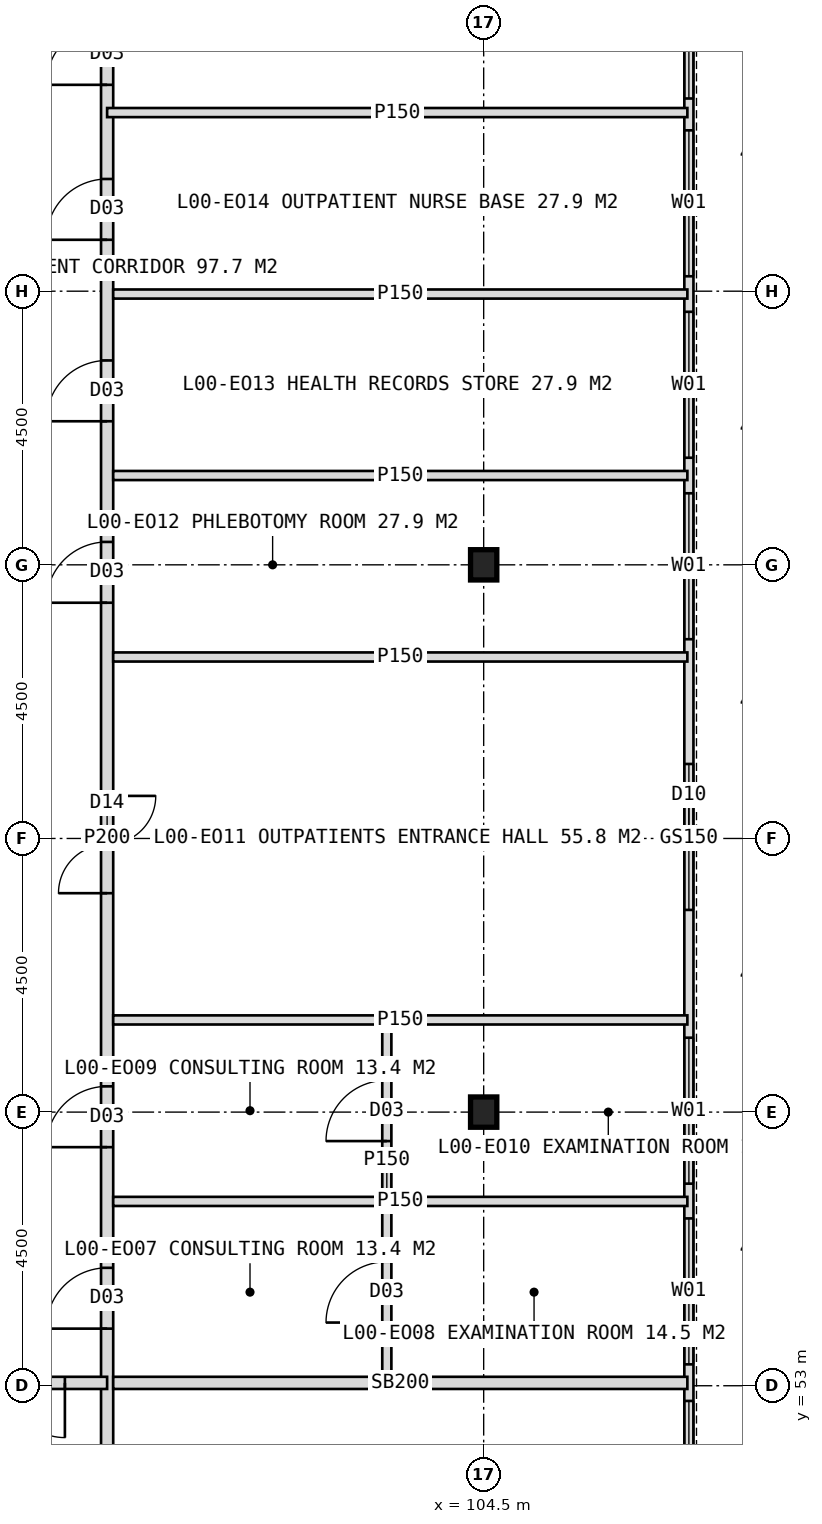
"""IFC4 building model, lengths in metres.
Left out: names, types, materials, properties, quantities, classifications, styles, units other than length and angle.
Written with IfcOpenShell. Run it as: python <this file> out.ifc"""

import sys

from ifc_helpers import new_model, si_unit, direction, frame, frame_2d, origin, origin_2d, place, context, subcontext, project, spatial, rectangle, i_section, extrude, element, fill, save


model = new_model("IFC4")
c1 = context("Model", 3, precision=1e-05, world=origin(), true_north=direction((0.0, 1.0)))
c2 = subcontext(c1, "Body", "Model", "MODEL_VIEW")
j1 = project(units=[si_unit("LENGTHUNIT", "METRE"), si_unit("PLANEANGLEUNIT", "RADIAN")], contexts=[c1])
p1 = place(None, origin())
s1 = spatial("IfcSite", under=j1, at=p1, CompositionType="ELEMENT")
p2 = place(p1, origin())
s2 = spatial("IfcBuilding", under=s1, at=p2, CompositionType="ELEMENT")
p3 = place(p2, origin())
s3 = spatial("IfcBuildingStorey", under=s2, at=p3, CompositionType="ELEMENT", Elevation=0.0)
for number, where, z_axis, x_axis in (
    (1, (104.5, 57.5, 0.0), (0.0, 0.0, 1.0), (1.0, 0.0, 0.0)),
    (2, (104.5, 66.5, 0.0), (0.0, 0.0, 1.0), (1.0, 0.0, 0.0)),
):
    element("IfcColumn", number, at=place(p3, frame(where, z_axis=z_axis, x_axis=x_axis)), inside=s3, PredefinedType="COLUMN", context=c2, shape_type="SweptSolid", body=[
        extrude(i_section(OverallWidth=0.432, OverallDepth=0.498, WebThickness=0.056, FlangeThickness=0.089, FilletRadius=0.015, at=origin_2d()), origin(), (0.0, 0.0, 1.0), 6.0),
    ])
p4 = place(p3, frame((107.875, 38.125, 0.0), z_axis=(0.0, 0.0, 1.0), x_axis=(0.0, 1.0, 0.0)))
e3 = element("IfcWall", 3, at=p4, inside=s3, PredefinedType="STANDARD", context=c2, shape_type="SweptSolid", body=[
    extrude(rectangle(XDim=47.75, YDim=0.15, at=frame_2d((23.875, 0.0))), origin(), (0.0, 0.0, 1.0), 6.0),
])
p5 = place(p4, frame((22.7, 0.0, 0.0)))
e4 = element("IfcOpeningElement", 4, at=p5, cuts=e3, PredefinedType="OPENING", context=c2, shape_type="SweptSolid", body=[
    extrude(rectangle(XDim=2.4, YDim=2.6, at=frame_2d((1.2, 1.3))), frame((0.0, 0.085, 0.0), z_axis=(0.0, -1.0, 0.0), x_axis=(1.0, 0.0, 0.0)), (0.0, 0.0, 1.0), 0.17),
])
p6 = place(p4, frame((0.33, 0.0, 0.6)))
e5 = element("IfcOpeningElement", 5, at=p6, cuts=e3, PredefinedType="OPENING", context=c2, shape_type="SweptSolid", body=[
    extrude(rectangle(XDim=2.4, YDim=3.0, at=frame_2d((1.2, 1.5))), frame((0.0, 0.085, 0.0), z_axis=(0.0, -1.0, 0.0), x_axis=(1.0, 0.0, 0.0)), (0.0, 0.0, 1.0), 0.17),
])
p7 = place(p4, frame((3.277, 0.0, 0.6)))
e6 = element("IfcOpeningElement", 6, at=p7, cuts=e3, PredefinedType="OPENING", context=c2, shape_type="SweptSolid", body=[
    extrude(rectangle(XDim=2.4, YDim=3.0, at=frame_2d((1.2, 1.5))), frame((0.0, 0.085, 0.0), z_axis=(0.0, -1.0, 0.0), x_axis=(1.0, 0.0, 0.0)), (0.0, 0.0, 1.0), 0.17),
])
p8 = place(p4, frame((6.261, 0.0, 0.6)))
e7 = element("IfcOpeningElement", 7, at=p8, cuts=e3, PredefinedType="OPENING", context=c2, shape_type="SweptSolid", body=[
    extrude(rectangle(XDim=2.4, YDim=3.0, at=frame_2d((1.2, 1.5))), frame((0.0, 0.085, 0.0), z_axis=(0.0, -1.0, 0.0), x_axis=(1.0, 0.0, 0.0)), (0.0, 0.0, 1.0), 0.17),
])
p9 = place(p4, frame((9.225, 0.0, 0.6)))
e8 = element("IfcOpeningElement", 8, at=p9, cuts=e3, PredefinedType="OPENING", context=c2, shape_type="SweptSolid", body=[
    extrude(rectangle(XDim=2.4, YDim=3.0, at=frame_2d((1.2, 1.5))), frame((0.0, 0.085, 0.0), z_axis=(0.0, -1.0, 0.0), x_axis=(1.0, 0.0, 0.0)), (0.0, 0.0, 1.0), 0.17),
])
p10 = place(p4, frame((12.225, 0.0, 0.6)))
e9 = element("IfcOpeningElement", 9, at=p10, cuts=e3, PredefinedType="OPENING", context=c2, shape_type="SweptSolid", body=[
    extrude(rectangle(XDim=2.4, YDim=3.0, at=frame_2d((1.2, 1.5))), frame((0.0, 0.085, 0.0), z_axis=(0.0, -1.0, 0.0), x_axis=(1.0, 0.0, 0.0)), (0.0, 0.0, 1.0), 0.17),
])
p11 = place(p4, frame((15.227, 0.0, 0.6)))
e10 = element("IfcOpeningElement", 10, at=p11, cuts=e3, PredefinedType="OPENING", context=c2, shape_type="SweptSolid", body=[
    extrude(rectangle(XDim=2.4, YDim=3.0, at=frame_2d((1.2, 1.5))), frame((0.0, 0.085, 0.0), z_axis=(0.0, -1.0, 0.0), x_axis=(1.0, 0.0, 0.0)), (0.0, 0.0, 1.0), 0.17),
])
p12 = place(p4, frame((18.198, 0.0, 0.6)))
e11 = element("IfcOpeningElement", 11, at=p12, cuts=e3, PredefinedType="OPENING", context=c2, shape_type="SweptSolid", body=[
    extrude(rectangle(XDim=2.4, YDim=3.0, at=frame_2d((1.2, 1.5))), frame((0.0, 0.085, 0.0), z_axis=(0.0, -1.0, 0.0), x_axis=(1.0, 0.0, 0.0)), (0.0, 0.0, 1.0), 0.17),
])
p13 = place(p4, frame((27.152, 0.0, 0.6)))
e12 = element("IfcOpeningElement", 12, at=p13, cuts=e3, PredefinedType="OPENING", context=c2, shape_type="SweptSolid", body=[
    extrude(rectangle(XDim=2.4, YDim=3.0, at=frame_2d((1.2, 1.5))), frame((0.0, 0.085, 0.0), z_axis=(0.0, -1.0, 0.0), x_axis=(1.0, 0.0, 0.0)), (0.0, 0.0, 1.0), 0.17),
])
p14 = place(p4, frame((30.136, 0.0, 0.6)))
e13 = element("IfcOpeningElement", 13, at=p14, cuts=e3, PredefinedType="OPENING", context=c2, shape_type="SweptSolid", body=[
    extrude(rectangle(XDim=2.4, YDim=3.0, at=frame_2d((1.2, 1.5))), frame((0.0, 0.085, 0.0), z_axis=(0.0, -1.0, 0.0), x_axis=(1.0, 0.0, 0.0)), (0.0, 0.0, 1.0), 0.17),
])
p15 = place(p4, frame((33.12, 0.0, 0.6)))
e14 = element("IfcOpeningElement", 14, at=p15, cuts=e3, PredefinedType="OPENING", context=c2, shape_type="SweptSolid", body=[
    extrude(rectangle(XDim=2.4, YDim=3.0, at=frame_2d((1.2, 1.5))), frame((0.0, 0.085, 0.0), z_axis=(0.0, -1.0, 0.0), x_axis=(1.0, 0.0, 0.0)), (0.0, 0.0, 1.0), 0.17),
])
p16 = place(p4, frame((36.044, 0.0, 0.6)))
e15 = element("IfcOpeningElement", 15, at=p16, cuts=e3, PredefinedType="OPENING", context=c2, shape_type="SweptSolid", body=[
    extrude(rectangle(XDim=2.4, YDim=3.0, at=frame_2d((1.2, 1.5))), frame((0.0, 0.085, 0.0), z_axis=(0.0, -1.0, 0.0), x_axis=(1.0, 0.0, 0.0)), (0.0, 0.0, 1.0), 0.17),
])
p17 = place(p4, frame((39.044, 0.0, 0.6)))
e16 = element("IfcOpeningElement", 16, at=p17, cuts=e3, PredefinedType="OPENING", context=c2, shape_type="SweptSolid", body=[
    extrude(rectangle(XDim=2.4, YDim=3.0, at=frame_2d((1.2, 1.5))), frame((0.0, 0.085, 0.0), z_axis=(0.0, -1.0, 0.0), x_axis=(1.0, 0.0, 0.0)), (0.0, 0.0, 1.0), 0.17),
])
p18 = place(p4, frame((42.044, 0.0, 0.6)))
e17 = element("IfcOpeningElement", 17, at=p18, cuts=e3, PredefinedType="OPENING", context=c2, shape_type="SweptSolid", body=[
    extrude(rectangle(XDim=2.4, YDim=3.0, at=frame_2d((1.2, 1.5))), frame((0.0, 0.085, 0.0), z_axis=(0.0, -1.0, 0.0), x_axis=(1.0, 0.0, 0.0)), (0.0, 0.0, 1.0), 0.17),
])
p19 = place(p4, frame((45.044, 0.0, 0.6)))
e18 = element("IfcOpeningElement", 18, at=p19, cuts=e3, PredefinedType="OPENING", context=c2, shape_type="SweptSolid", body=[
    extrude(rectangle(XDim=2.4, YDim=3.0, at=frame_2d((1.2, 1.5))), frame((0.0, 0.085, 0.0), z_axis=(0.0, -1.0, 0.0), x_axis=(1.0, 0.0, 0.0)), (0.0, 0.0, 1.0), 0.17),
])
p20 = place(p3, frame((98.307, 38.15, 0.0), z_axis=(0.0, 0.0, 1.0), x_axis=(0.0, 1.0, 0.0)))
e19 = element("IfcWall", 19, at=p20, inside=s3, PredefinedType="PARTITIONING", context=c2, shape_type="SweptSolid", body=[
    extrude(rectangle(XDim=47.7, YDim=0.2, at=frame_2d((23.85, 0.0))), origin(), (0.0, 0.0, 1.0), 5.7),
])
p21 = place(p20, frame((45.7, 0.0, 0.0)))
e20 = element("IfcOpeningElement", 20, at=p21, cuts=e19, PredefinedType="OPENING", context=c2, shape_type="SweptSolid", body=[
    extrude(rectangle(XDim=1.2, YDim=2.1, at=frame_2d((0.6, 1.05))), frame((0.0, 0.11, 0.0), z_axis=(0.0, -1.0, 0.0), x_axis=(1.0, 0.0, 0.0)), (0.0, 0.0, 1.0), 0.22),
])
p22 = place(p20, frame((36.244, 0.0, 0.0)))
e21 = element("IfcOpeningElement", 21, at=p22, cuts=e19, PredefinedType="OPENING", context=c2, shape_type="SweptSolid", body=[
    extrude(rectangle(XDim=1.0, YDim=2.1, at=frame_2d((0.5, 1.05))), frame((0.0, 0.11, 0.0), z_axis=(0.0, -1.0, 0.0), x_axis=(1.0, 0.0, 0.0)), (0.0, 0.0, 1.0), 0.22),
])
p23 = place(p20, frame((0.93, 0.0, 0.0)))
e22 = element("IfcOpeningElement", 22, at=p23, cuts=e19, PredefinedType="OPENING", context=c2, shape_type="SweptSolid", body=[
    extrude(rectangle(XDim=1.0, YDim=2.1, at=frame_2d((0.5, 1.05))), frame((0.0, 0.11, 0.0), z_axis=(0.0, -1.0, 0.0), x_axis=(1.0, 0.0, 0.0)), (0.0, 0.0, 1.0), 0.22),
])
p24 = place(p20, frame((3.852, 0.0, 0.0)))
e23 = element("IfcOpeningElement", 23, at=p24, cuts=e19, PredefinedType="OPENING", context=c2, shape_type="SweptSolid", body=[
    extrude(rectangle(XDim=1.0, YDim=2.1, at=frame_2d((0.5, 1.05))), frame((0.0, 0.11, 0.0), z_axis=(0.0, -1.0, 0.0), x_axis=(1.0, 0.0, 0.0)), (0.0, 0.0, 1.0), 0.22),
])
p25 = place(p20, frame((6.836, 0.0, 0.0)))
e24 = element("IfcOpeningElement", 24, at=p25, cuts=e19, PredefinedType="OPENING", context=c2, shape_type="SweptSolid", body=[
    extrude(rectangle(XDim=1.0, YDim=2.1, at=frame_2d((0.5, 1.05))), frame((0.0, 0.11, 0.0), z_axis=(0.0, -1.0, 0.0), x_axis=(1.0, 0.0, 0.0)), (0.0, 0.0, 1.0), 0.22),
])
p26 = place(p20, frame((11.012, 0.0, 0.0)))
e25 = element("IfcOpeningElement", 25, at=p26, cuts=e19, PredefinedType="OPENING", context=c2, shape_type="SweptSolid", body=[
    extrude(rectangle(XDim=1.6, YDim=2.2, at=frame_2d((0.8, 1.1))), frame((0.0, 0.11, 0.0), z_axis=(0.0, -1.0, 0.0), x_axis=(1.0, 0.0, 0.0)), (0.0, 0.0, 1.0), 0.22),
])
p27 = place(p20, frame((15.789, 0.0, 0.0)))
e26 = element("IfcOpeningElement", 26, at=p27, cuts=e19, PredefinedType="OPENING", context=c2, shape_type="SweptSolid", body=[
    extrude(rectangle(XDim=1.0, YDim=2.1, at=frame_2d((0.5, 1.05))), frame((0.0, 0.11, 0.0), z_axis=(0.0, -1.0, 0.0), x_axis=(1.0, 0.0, 0.0)), (0.0, 0.0, 1.0), 0.22),
])
p28 = place(p20, frame((18.773, 0.0, 0.0)))
e27 = element("IfcOpeningElement", 27, at=p28, cuts=e19, PredefinedType="OPENING", context=c2, shape_type="SweptSolid", body=[
    extrude(rectangle(XDim=1.0, YDim=2.1, at=frame_2d((0.5, 1.05))), frame((0.0, 0.11, 0.0), z_axis=(0.0, -1.0, 0.0), x_axis=(1.0, 0.0, 0.0)), (0.0, 0.0, 1.0), 0.22),
])
p29 = place(p20, frame((22.95, 0.0, 0.0)))
e28 = element("IfcOpeningElement", 28, at=p29, cuts=e19, PredefinedType="OPENING", context=c2, shape_type="SweptSolid", body=[
    extrude(rectangle(XDim=1.6, YDim=2.2, at=frame_2d((0.8, 1.1))), frame((0.0, 0.11, 0.0), z_axis=(0.0, -1.0, 0.0), x_axis=(1.0, 0.0, 0.0)), (0.0, 0.0, 1.0), 0.22),
])
p30 = place(p20, frame((27.727, 0.0, 0.0)))
e29 = element("IfcOpeningElement", 29, at=p30, cuts=e19, PredefinedType="OPENING", context=c2, shape_type="SweptSolid", body=[
    extrude(rectangle(XDim=1.0, YDim=2.1, at=frame_2d((0.5, 1.05))), frame((0.0, 0.11, 0.0), z_axis=(0.0, -1.0, 0.0), x_axis=(1.0, 0.0, 0.0)), (0.0, 0.0, 1.0), 0.22),
])
p31 = place(p20, frame((30.711, 0.0, 0.0)))
e30 = element("IfcOpeningElement", 30, at=p31, cuts=e19, PredefinedType="OPENING", context=c2, shape_type="SweptSolid", body=[
    extrude(rectangle(XDim=1.0, YDim=2.1, at=frame_2d((0.5, 1.05))), frame((0.0, 0.11, 0.0), z_axis=(0.0, -1.0, 0.0), x_axis=(1.0, 0.0, 0.0)), (0.0, 0.0, 1.0), 0.22),
])
p32 = place(p20, frame((33.695, 0.0, 0.0)))
e31 = element("IfcOpeningElement", 31, at=p32, cuts=e19, PredefinedType="OPENING", context=c2, shape_type="SweptSolid", body=[
    extrude(rectangle(XDim=1.0, YDim=2.1, at=frame_2d((0.5, 1.05))), frame((0.0, 0.11, 0.0), z_axis=(0.0, -1.0, 0.0), x_axis=(1.0, 0.0, 0.0)), (0.0, 0.0, 1.0), 0.22),
])
p33 = place(p3, frame((98.307, 53.047, 0.0), z_axis=(0.0, 0.0, 1.0), x_axis=(-1.0, 0.0, 0.0)))
e32 = element("IfcWall", 32, at=p33, inside=s3, PredefinedType="SOLIDWALL", context=c2, shape_type="SweptSolid", body=[
    extrude(rectangle(XDim=3.189, YDim=0.2, at=frame_2d((1.594, 0.0))), origin(), (0.0, 0.0, 1.0), 5.7),
])
p34 = place(p33, frame((0.695, 0.0, 0.0)))
e33 = element("IfcOpeningElement", 33, at=p34, cuts=e32, PredefinedType="OPENING", context=c2, shape_type="SweptSolid", body=[
    extrude(rectangle(XDim=1.8, YDim=2.2, at=frame_2d((0.9, 1.1))), frame((0.0, 0.11, 0.0), z_axis=(0.0, -1.0, 0.0), x_axis=(1.0, 0.0, 0.0)), (0.0, 0.0, 1.0), 0.22),
])
p35 = place(p3, frame((107.85, 73.938, 0.0), z_axis=(0.0, 0.0, 1.0), x_axis=(-1.0, 0.0, 0.0)))
e34 = element("IfcWall", 34, at=p35, inside=s3, PredefinedType="PARTITIONING", context=c2, shape_type="SweptSolid", body=[
    extrude(rectangle(XDim=9.543, YDim=0.15, at=frame_2d((4.771, 0.0))), origin(), (0.0, 0.0, 1.0), 5.7),
])
p36 = place(p3, frame((107.85, 53.047, 0.0), z_axis=(0.0, 0.0, 1.0), x_axis=(-1.0, 0.0, 0.0)))
e35 = element("IfcWall", 35, at=p36, inside=s3, PredefinedType="SOLIDWALL", context=c2, shape_type="SweptSolid", body=[
    extrude(rectangle(XDim=9.443, YDim=0.2, at=frame_2d((4.722, 0.0))), origin(), (0.0, 0.0, 1.0), 5.7),
])
for number, where, z_axis, x_axis in (
    (36, (107.85, 56.031, 0.0), (0.0, 0.0, 1.0), (-1.0, 0.0, 0.0)),
    (37, (107.85, 59.016, 0.0), (0.0, 0.0, 1.0), (-1.0, 0.0, 0.0)),
    (38, (107.85, 64.984, 0.0), (0.0, 0.0, 1.0), (-1.0, 0.0, 0.0)),
    (39, (107.85, 67.969, 0.0), (0.0, 0.0, 1.0), (-1.0, 0.0, 0.0)),
    (40, (107.85, 70.953, 0.0), (0.0, 0.0, 1.0), (-1.0, 0.0, 0.0)),
):
    element("IfcWall", number, at=place(p3, frame(where, z_axis=z_axis, x_axis=x_axis)), inside=s3, PredefinedType="PARTITIONING", context=c2, shape_type="SweptSolid", body=[
        extrude(rectangle(XDim=9.443, YDim=0.15, at=frame_2d((4.722, 0.0))), origin(), (0.0, 0.0, 1.0), 5.7),
    ])
p37 = place(p3, frame((102.907, 53.047, 0.0), z_axis=(0.0, 0.0, 1.0), x_axis=(0.0, 1.0, 0.0)))
e41 = element("IfcWall", 41, at=p37, inside=s3, PredefinedType="PARTITIONING", context=c2, shape_type="SweptSolid", body=[
    extrude(rectangle(XDim=5.969, YDim=0.15, at=frame_2d((2.984, 0.0))), origin(), (0.0, 0.0, 1.0), 5.7),
])
p38 = place(p37, frame((0.992, 0.0, 0.0)))
e42 = element("IfcOpeningElement", 42, at=p38, cuts=e41, PredefinedType="OPENING", context=c2, shape_type="SweptSolid", body=[
    extrude(rectangle(XDim=1.0, YDim=2.1, at=frame_2d((0.5, 1.05))), frame((0.0, 0.085, 0.0), z_axis=(0.0, -1.0, 0.0), x_axis=(1.0, 0.0, 0.0)), (0.0, 0.0, 1.0), 0.17),
])
p39 = place(p37, frame((3.977, 0.0, 0.0)))
e43 = element("IfcOpeningElement", 43, at=p39, cuts=e41, PredefinedType="OPENING", context=c2, shape_type="SweptSolid", body=[
    extrude(rectangle(XDim=1.0, YDim=2.1, at=frame_2d((0.5, 1.05))), frame((0.0, 0.085, 0.0), z_axis=(0.0, -1.0, 0.0), x_axis=(1.0, 0.0, 0.0)), (0.0, 0.0, 1.0), 0.17),
])
p40 = place(p5, origin())
e44 = element("IfcDoor", 44, at=p40, inside=s3, OperationType="DOUBLE_DOOR_SLIDING", PredefinedType="DOOR", context=c2, shape_type="SweptSolid", body=[
    extrude(rectangle(XDim=2.4, YDim=2.6, at=frame_2d((1.2, 1.3))), frame((0.0, 0.025, 0.0), z_axis=(0.0, -1.0, 0.0), x_axis=(1.0, 0.0, 0.0)), (0.0, 0.0, 1.0), 0.05),
])
fill(e4, e44)
p41 = place(p10, origin())
e45 = element("IfcWindow", 45, at=p41, inside=s3, PartitioningType="SINGLE_PANEL", PredefinedType="WINDOW", context=c2, shape_type="SweptSolid", body=[
    extrude(rectangle(XDim=2.4, YDim=3.0, at=frame_2d((1.2, 1.5))), frame((0.0, 0.03, 0.0), z_axis=(0.0, -1.0, 0.0), x_axis=(1.0, 0.0, 0.0)), (0.0, 0.0, 1.0), 0.06),
])
fill(e9, e45)
p42 = place(p11, origin())
e46 = element("IfcWindow", 46, at=p42, inside=s3, PartitioningType="SINGLE_PANEL", PredefinedType="WINDOW", context=c2, shape_type="SweptSolid", body=[
    extrude(rectangle(XDim=2.4, YDim=3.0, at=frame_2d((1.2, 1.5))), frame((0.0, 0.03, 0.0), z_axis=(0.0, -1.0, 0.0), x_axis=(1.0, 0.0, 0.0)), (0.0, 0.0, 1.0), 0.06),
])
fill(e10, e46)
p43 = place(p12, origin())
e47 = element("IfcWindow", 47, at=p43, inside=s3, PartitioningType="SINGLE_PANEL", PredefinedType="WINDOW", context=c2, shape_type="SweptSolid", body=[
    extrude(rectangle(XDim=2.4, YDim=3.0, at=frame_2d((1.2, 1.5))), frame((0.0, 0.03, 0.0), z_axis=(0.0, -1.0, 0.0), x_axis=(1.0, 0.0, 0.0)), (0.0, 0.0, 1.0), 0.06),
])
fill(e11, e47)
p44 = place(p13, origin())
e48 = element("IfcWindow", 48, at=p44, inside=s3, PartitioningType="SINGLE_PANEL", PredefinedType="WINDOW", context=c2, shape_type="SweptSolid", body=[
    extrude(rectangle(XDim=2.4, YDim=3.0, at=frame_2d((1.2, 1.5))), frame((0.0, 0.03, 0.0), z_axis=(0.0, -1.0, 0.0), x_axis=(1.0, 0.0, 0.0)), (0.0, 0.0, 1.0), 0.06),
])
fill(e12, e48)
p45 = place(p14, origin())
e49 = element("IfcWindow", 49, at=p45, inside=s3, PartitioningType="SINGLE_PANEL", PredefinedType="WINDOW", context=c2, shape_type="SweptSolid", body=[
    extrude(rectangle(XDim=2.4, YDim=3.0, at=frame_2d((1.2, 1.5))), frame((0.0, 0.03, 0.0), z_axis=(0.0, -1.0, 0.0), x_axis=(1.0, 0.0, 0.0)), (0.0, 0.0, 1.0), 0.06),
])
fill(e13, e49)
p46 = place(p15, origin())
e50 = element("IfcWindow", 50, at=p46, inside=s3, PartitioningType="SINGLE_PANEL", PredefinedType="WINDOW", context=c2, shape_type="SweptSolid", body=[
    extrude(rectangle(XDim=2.4, YDim=3.0, at=frame_2d((1.2, 1.5))), frame((0.0, 0.03, 0.0), z_axis=(0.0, -1.0, 0.0), x_axis=(1.0, 0.0, 0.0)), (0.0, 0.0, 1.0), 0.06),
])
fill(e14, e50)
p47 = place(p16, origin())
e51 = element("IfcWindow", 51, at=p47, inside=s3, PartitioningType="SINGLE_PANEL", PredefinedType="WINDOW", context=c2, shape_type="SweptSolid", body=[
    extrude(rectangle(XDim=2.4, YDim=3.0, at=frame_2d((1.2, 1.5))), frame((0.0, 0.03, 0.0), z_axis=(0.0, -1.0, 0.0), x_axis=(1.0, 0.0, 0.0)), (0.0, 0.0, 1.0), 0.06),
])
fill(e15, e51)
p48 = place(p34, origin())
e52 = element("IfcDoor", 52, at=p48, inside=s3, OperationType="DOUBLE_DOOR_DOUBLE_SWING", PredefinedType="DOOR", context=c2, shape_type="SweptSolid", body=[
    extrude(rectangle(XDim=1.8, YDim=2.2, at=frame_2d((0.9, 1.1))), frame((0.0, 0.025, 0.0), z_axis=(0.0, -1.0, 0.0), x_axis=(1.0, 0.0, 0.0)), (0.0, 0.0, 1.0), 0.05),
])
fill(e33, e52)
p49 = place(p22, origin())
e53 = element("IfcDoor", 53, at=p49, inside=s3, OperationType="SINGLE_SWING_LEFT", PredefinedType="DOOR", context=c2, shape_type="SweptSolid", body=[
    extrude(rectangle(XDim=1.0, YDim=2.1, at=frame_2d((0.5, 1.05))), frame((0.0, 0.025, 0.0), z_axis=(0.0, -1.0, 0.0), x_axis=(1.0, 0.0, 0.0)), (0.0, 0.0, 1.0), 0.05),
])
fill(e21, e53)
p50 = place(p27, origin())
e54 = element("IfcDoor", 54, at=p50, inside=s3, OperationType="SINGLE_SWING_LEFT", PredefinedType="DOOR", context=c2, shape_type="SweptSolid", body=[
    extrude(rectangle(XDim=1.0, YDim=2.1, at=frame_2d((0.5, 1.05))), frame((0.0, 0.025, 0.0), z_axis=(0.0, -1.0, 0.0), x_axis=(1.0, 0.0, 0.0)), (0.0, 0.0, 1.0), 0.05),
])
fill(e26, e54)
p51 = place(p38, origin())
e55 = element("IfcDoor", 55, at=p51, inside=s3, OperationType="SINGLE_SWING_LEFT", PredefinedType="DOOR", context=c2, shape_type="SweptSolid", body=[
    extrude(rectangle(XDim=1.0, YDim=2.1, at=frame_2d((0.5, 1.05))), frame((0.0, 0.025, 0.0), z_axis=(0.0, -1.0, 0.0), x_axis=(1.0, 0.0, 0.0)), (0.0, 0.0, 1.0), 0.05),
])
fill(e42, e55)
p52 = place(p28, origin())
e56 = element("IfcDoor", 56, at=p52, inside=s3, OperationType="SINGLE_SWING_LEFT", PredefinedType="DOOR", context=c2, shape_type="SweptSolid", body=[
    extrude(rectangle(XDim=1.0, YDim=2.1, at=frame_2d((0.5, 1.05))), frame((0.0, 0.025, 0.0), z_axis=(0.0, -1.0, 0.0), x_axis=(1.0, 0.0, 0.0)), (0.0, 0.0, 1.0), 0.05),
])
fill(e27, e56)
p53 = place(p39, origin())
e57 = element("IfcDoor", 57, at=p53, inside=s3, OperationType="SINGLE_SWING_LEFT", PredefinedType="DOOR", context=c2, shape_type="SweptSolid", body=[
    extrude(rectangle(XDim=1.0, YDim=2.1, at=frame_2d((0.5, 1.05))), frame((0.0, 0.025, 0.0), z_axis=(0.0, -1.0, 0.0), x_axis=(1.0, 0.0, 0.0)), (0.0, 0.0, 1.0), 0.05),
])
fill(e43, e57)
p54 = place(p29, origin())
e58 = element("IfcDoor", 58, at=p54, inside=s3, OperationType="DOUBLE_DOOR_DOUBLE_SWING", PredefinedType="DOOR", context=c2, shape_type="SweptSolid", body=[
    extrude(rectangle(XDim=1.6, YDim=2.2, at=frame_2d((0.8, 1.1))), frame((0.0, 0.025, 0.0), z_axis=(0.0, -1.0, 0.0), x_axis=(1.0, 0.0, 0.0)), (0.0, 0.0, 1.0), 0.05),
])
fill(e28, e58)
p55 = place(p30, origin())
e59 = element("IfcDoor", 59, at=p55, inside=s3, OperationType="SINGLE_SWING_LEFT", PredefinedType="DOOR", context=c2, shape_type="SweptSolid", body=[
    extrude(rectangle(XDim=1.0, YDim=2.1, at=frame_2d((0.5, 1.05))), frame((0.0, 0.025, 0.0), z_axis=(0.0, -1.0, 0.0), x_axis=(1.0, 0.0, 0.0)), (0.0, 0.0, 1.0), 0.05),
])
fill(e29, e59)
p56 = place(p31, origin())
e60 = element("IfcDoor", 60, at=p56, inside=s3, OperationType="SINGLE_SWING_LEFT", PredefinedType="DOOR", context=c2, shape_type="SweptSolid", body=[
    extrude(rectangle(XDim=1.0, YDim=2.1, at=frame_2d((0.5, 1.05))), frame((0.0, 0.025, 0.0), z_axis=(0.0, -1.0, 0.0), x_axis=(1.0, 0.0, 0.0)), (0.0, 0.0, 1.0), 0.05),
])
fill(e30, e60)
p57 = place(p32, origin())
e61 = element("IfcDoor", 61, at=p57, inside=s3, OperationType="SINGLE_SWING_LEFT", PredefinedType="DOOR", context=c2, shape_type="SweptSolid", body=[
    extrude(rectangle(XDim=1.0, YDim=2.1, at=frame_2d((0.5, 1.05))), frame((0.0, 0.025, 0.0), z_axis=(0.0, -1.0, 0.0), x_axis=(1.0, 0.0, 0.0)), (0.0, 0.0, 1.0), 0.05),
])
fill(e31, e61)
save(model, sys.argv[1])
